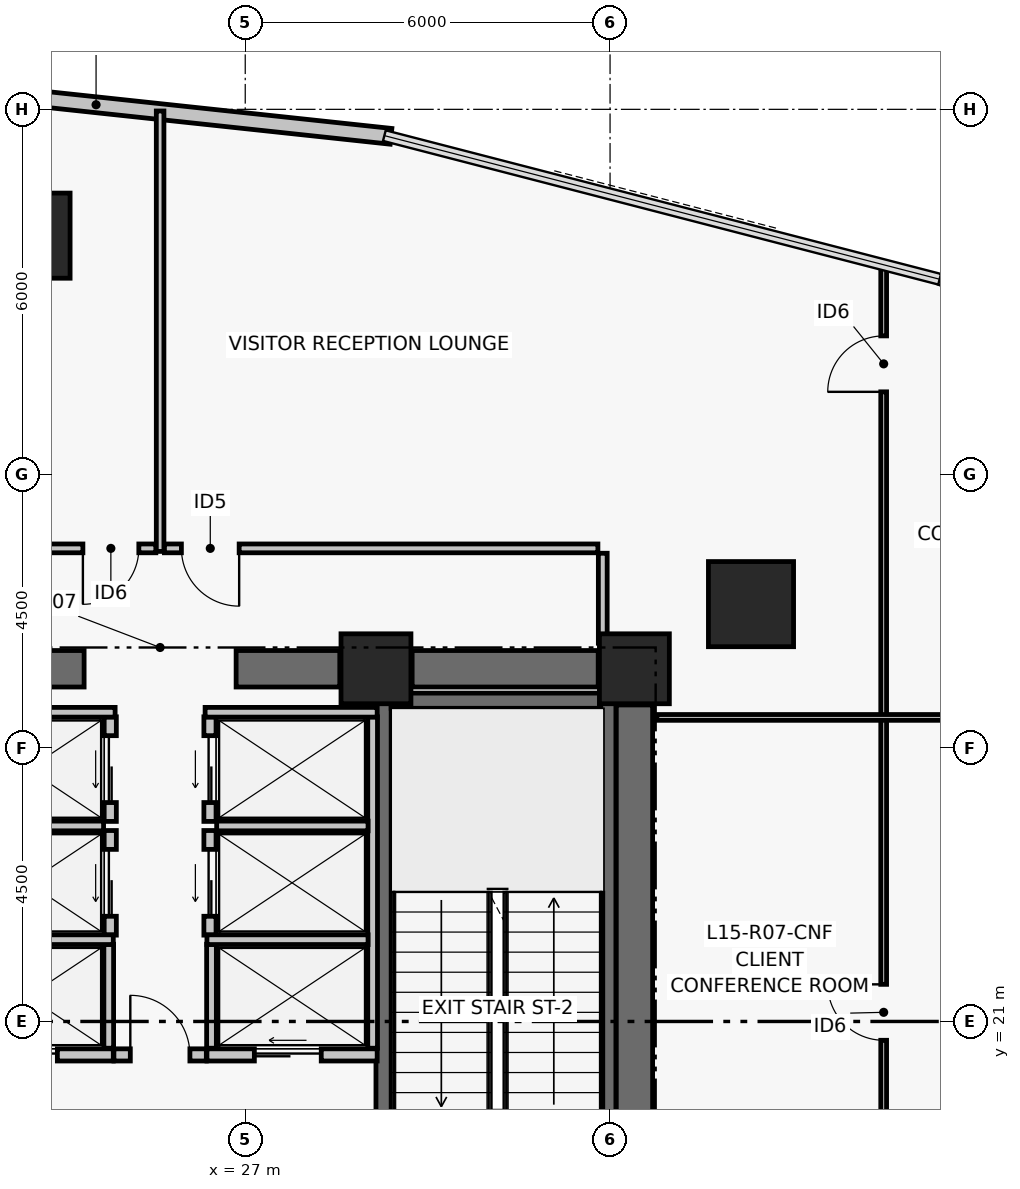
"""IFC4 building model, lengths in metres.
Left out: names, types, materials, properties, quantities, classifications, styles, units other than length and angle.
Written with IfcOpenShell. Run it as: python <this file> out.ifc"""

import sys

from ifc_helpers import new_model, si_unit, direction, frame, frame_2d, origin, origin_2d, place, context, subcontext, project, spatial, rectangle, hollow_rectangle, extrude, element, fill, save


model = new_model("IFC4")
c1 = context("Model", 3, precision=1e-05, world=origin(), true_north=direction((0.0, 1.0)))
c2 = subcontext(c1, "Body", "Model", "MODEL_VIEW")
j1 = project(units=[si_unit("LENGTHUNIT", "METRE"), si_unit("PLANEANGLEUNIT", "RADIAN")], contexts=[c1])
p1 = place(None, origin())
s1 = spatial("IfcSite", under=j1, at=p1, CompositionType="ELEMENT")
p2 = place(p1, origin())
s2 = spatial("IfcBuilding", under=s1, at=p2, CompositionType="ELEMENT")
p3 = place(p2, frame((0.0, 0.0, 64.8)))
s3 = spatial("IfcBuildingStorey", under=s2, at=p3, CompositionType="ELEMENT", Elevation=64.8)
for number, where, z_axis, x_axis in (
    (1, (29.15, 26.8, 0.0), (0.0, 0.0, 1.0), (1.0, 0.0, 0.0)),
    (2, (33.4, 26.8, 0.0), (0.0, 0.0, 1.0), (1.0, 0.0, 0.0)),
):
    element("IfcColumn", number, at=place(p3, frame(where, z_axis=z_axis, x_axis=x_axis)), inside=s3, PredefinedType="COLUMN", context=c2, shape_type="SweptSolid", body=[
        extrude(rectangle(XDim=1.15, YDim=1.15, at=origin_2d()), origin(), (0.0, 0.0, 1.0), 3.72),
    ])
p4 = place(p3, frame((22.645, 26.8, 0.0), z_axis=(0.0, 0.0, 1.0), x_axis=(1.0, 0.0, 0.0)))
e3 = element("IfcWall", 3, at=p4, inside=s3, PredefinedType="SHEAR", context=c2, shape_type="SweptSolid", body=[
    extrude(rectangle(XDim=1.705, YDim=0.6, at=frame_2d((0.853, 0.0))), origin(), (0.0, 0.0, 1.0), 3.44),
])
p5 = place(p3, frame((26.85, 26.8, 0.0), z_axis=(0.0, 0.0, 1.0), x_axis=(1.0, 0.0, 0.0)))
e4 = element("IfcWall", 4, at=p5, inside=s3, PredefinedType="SHEAR", context=c2, shape_type="SweptSolid", body=[
    extrude(rectangle(XDim=1.705, YDim=0.6, at=frame_2d((0.853, 0.0))), origin(), (0.0, 0.0, 1.0), 3.44),
])
p6 = place(p3, frame((29.745, 26.8, 0.0), z_axis=(0.0, 0.0, 1.0), x_axis=(1.0, 0.0, 0.0)))
e5 = element("IfcWall", 5, at=p6, inside=s3, PredefinedType="SHEAR", context=c2, shape_type="SweptSolid", body=[
    extrude(rectangle(XDim=3.06, YDim=0.6, at=frame_2d((1.53, 0.0))), origin(), (0.0, 0.0, 1.0), 3.44),
])
p7 = place(p3, frame((33.4, 17.795, 0.0), z_axis=(0.0, 0.0, 1.0), x_axis=(0.0, 1.0, 0.0)))
e6 = element("IfcWall", 6, at=p7, inside=s3, PredefinedType="SHEAR", context=c2, shape_type="SweptSolid", body=[
    extrude(rectangle(XDim=8.41, YDim=0.6, at=frame_2d((4.205, 0.0))), origin(), (0.0, 0.0, 1.0), 3.44),
])
p8 = place(p3, frame((29.275, 17.6, 0.0), z_axis=(0.0, 0.0, 1.0), x_axis=(0.0, 1.0, 0.0)))
e7 = element("IfcWall", 7, at=p8, inside=s3, PredefinedType="SHEAR", context=c2, shape_type="SweptSolid", body=[
    extrude(rectangle(XDim=8.8, YDim=0.25, at=frame_2d((4.4, 0.0))), origin(), (0.0, 0.0, 1.0), 3.44),
])
p9 = place(p8, frame((0.35, 0.0, 0.0)))
e8 = element("IfcOpeningElement", 8, at=p9, cuts=e7, PredefinedType="OPENING", context=c2, shape_type="SweptSolid", body=[
    extrude(rectangle(XDim=1.05, YDim=2.08, at=frame_2d((0.525, 1.04))), frame((0.0, 0.135, 0.0), z_axis=(0.0, -1.0, 0.0), x_axis=(1.0, 0.0, 0.0)), (0.0, 0.0, 1.0), 0.27),
])
p10 = place(p3, frame((32.971, 17.6, 0.0), z_axis=(0.0, 0.0, 1.0), x_axis=(0.0, 1.0, 0.0)))
e9 = element("IfcWall", 9, at=p10, inside=s3, PredefinedType="SHEAR", context=c2, shape_type="SweptSolid", body=[
    extrude(rectangle(XDim=8.8, YDim=0.25, at=frame_2d((4.4, 0.0))), origin(), (0.0, 0.0, 1.0), 3.44),
])
p11 = place(p3, frame((29.4, 26.275, 0.0), z_axis=(0.0, 0.0, 1.0), x_axis=(1.0, 0.0, 0.0)))
e10 = element("IfcWall", 10, at=p11, inside=s3, PredefinedType="SHEAR", context=c2, shape_type="SweptSolid", body=[
    extrude(rectangle(XDim=3.446, YDim=0.25, at=frame_2d((1.723, 0.0))), origin(), (0.0, 0.0, 1.0), 3.44),
])
for number, where, z_axis, x_axis in (
    (11, (35.318, 27.863, 0.0), (0.0, 0.0, 1.0), (1.0, 0.0, 0.0)),
    (12, (23.419, 33.923, 0.0), (0.0, 0.0, 1.0), (1.0, 0.0, 0.0)),
):
    element("IfcColumn", number, at=place(p3, frame(where, z_axis=z_axis, x_axis=x_axis)), inside=s3, PredefinedType="COLUMN", context=c2, shape_type="SweptSolid", body=[
        extrude(hollow_rectangle(XDim=1.4, YDim=1.4, WallThickness=0.055, at=origin_2d()), origin(), (0.0, 0.0, 1.0), 3.72),
    ])
p12 = place(p3, frame((19.696, 36.595, 0.0), z_axis=(0.0, 0.0, 1.0), x_axis=(0.994319088673, -0.106440358419, 0.0)))
e13 = element("IfcWall", 13, at=p12, inside=s3, PredefinedType="PARTITIONING", context=c2, shape_type="SweptSolid", body=[
    extrude(rectangle(XDim=9.757, YDim=0.26, at=frame_2d((4.879, 0.0))), origin(), (0.0, 0.0, 1.0), 3.44),
])
p13 = place(p3, frame((24.84, 20.45, 0.0), z_axis=(0.0, 0.0, 1.0), x_axis=(1.0, 0.0, 0.0)))
e14 = element("IfcWall", 14, at=p13, inside=s3, PredefinedType="PARTITIONING", context=c2, shape_type="SweptSolid", body=[
    extrude(rectangle(XDim=1.52, YDim=0.2, at=frame_2d((0.76, 0.0))), origin(), (0.0, 0.0, 1.0), 3.44),
])
p14 = place(p13, frame((0.27, 0.0, 0.0)))
e15 = element("IfcOpeningElement", 15, at=p14, cuts=e14, PredefinedType="OPENING", context=c2, shape_type="SweptSolid", body=[
    extrude(rectangle(XDim=0.98, YDim=2.06, at=frame_2d((0.49, 1.03))), frame((0.0, 0.11, 0.0), z_axis=(0.0, -1.0, 0.0), x_axis=(1.0, 0.0, 0.0)), (0.0, 0.0, 1.0), 0.22),
])
p15 = place(p3, frame((22.03, 20.45, 0.0), z_axis=(0.0, 0.0, 1.0), x_axis=(1.0, 0.0, 0.0)))
e16 = element("IfcWall", 16, at=p15, inside=s3, PredefinedType="PARTITIONING", context=c2, shape_type="SweptSolid", body=[
    extrude(rectangle(XDim=2.8, YDim=0.2, at=frame_2d((1.4, 0.0))), origin(), (0.0, 0.0, 1.0), 3.44),
])
p16 = place(p15, frame((0.78, 0.0, 0.0)))
e17 = element("IfcOpeningElement", 17, at=p16, cuts=e16, PredefinedType="OPENING", context=c2, shape_type="SweptSolid", body=[
    extrude(rectangle(XDim=1.1, YDim=2.08, at=frame_2d((0.55, 1.04))), frame((0.0, 0.11, 0.0), z_axis=(0.0, -1.0, 0.0), x_axis=(1.0, 0.0, 0.0)), (0.0, 0.0, 1.0), 0.22),
])
p17 = place(p3, frame((26.37, 20.45, 0.0), z_axis=(0.0, 0.0, 1.0), x_axis=(1.0, 0.0, 0.0)))
e18 = element("IfcWall", 18, at=p17, inside=s3, PredefinedType="PARTITIONING", context=c2, shape_type="SweptSolid", body=[
    extrude(rectangle(XDim=2.8, YDim=0.2, at=frame_2d((1.4, 0.0))), origin(), (0.0, 0.0, 1.0), 3.44),
])
p18 = place(p17, frame((0.78, 0.0, 0.0)))
e19 = element("IfcOpeningElement", 19, at=p18, cuts=e18, PredefinedType="OPENING", context=c2, shape_type="SweptSolid", body=[
    extrude(rectangle(XDim=1.1, YDim=2.08, at=frame_2d((0.55, 1.04))), frame((0.0, 0.11, 0.0), z_axis=(0.0, -1.0, 0.0), x_axis=(1.0, 0.0, 0.0)), (0.0, 0.0, 1.0), 0.22),
])
p19 = place(p3, frame((24.78, 22.42, 0.0), z_axis=(0.0, 0.0, 1.0), x_axis=(0.0, 1.0, 0.0)))
e20 = element("IfcWall", 20, at=p19, inside=s3, PredefinedType="PARTITIONING", context=c2, shape_type="SweptSolid", body=[
    extrude(rectangle(XDim=1.72, YDim=0.2, at=frame_2d((0.86, 0.0))), origin(), (0.0, 0.0, 1.0), 3.44),
])
p20 = place(p19, frame((0.31, 0.0, 0.0)))
e21 = element("IfcOpeningElement", 21, at=p20, cuts=e20, PredefinedType="OPENING", context=c2, shape_type="SweptSolid", body=[
    extrude(rectangle(XDim=1.1, YDim=2.08, at=frame_2d((0.55, 1.04))), frame((0.0, 0.11, 0.0), z_axis=(0.0, -1.0, 0.0), x_axis=(1.0, 0.0, 0.0)), (0.0, 0.0, 1.0), 0.22),
])
p21 = place(p3, frame((24.78, 24.29, 0.0), z_axis=(0.0, 0.0, 1.0), x_axis=(0.0, 1.0, 0.0)))
e22 = element("IfcWall", 22, at=p21, inside=s3, PredefinedType="PARTITIONING", context=c2, shape_type="SweptSolid", body=[
    extrude(rectangle(XDim=1.72, YDim=0.2, at=frame_2d((0.86, 0.0))), origin(), (0.0, 0.0, 1.0), 3.44),
])
p22 = place(p21, frame((0.31, 0.0, 0.0)))
e23 = element("IfcOpeningElement", 23, at=p22, cuts=e22, PredefinedType="OPENING", context=c2, shape_type="SweptSolid", body=[
    extrude(rectangle(XDim=1.1, YDim=2.08, at=frame_2d((0.55, 1.04))), frame((0.0, 0.11, 0.0), z_axis=(0.0, -1.0, 0.0), x_axis=(1.0, 0.0, 0.0)), (0.0, 0.0, 1.0), 0.22),
])
p23 = place(p3, frame((26.42, 22.42, 0.0), z_axis=(0.0, 0.0, 1.0), x_axis=(0.0, 1.0, 0.0)))
e24 = element("IfcWall", 24, at=p23, inside=s3, PredefinedType="PARTITIONING", context=c2, shape_type="SweptSolid", body=[
    extrude(rectangle(XDim=1.72, YDim=0.2, at=frame_2d((0.86, 0.0))), origin(), (0.0, 0.0, 1.0), 3.44),
])
p24 = place(p23, frame((0.31, 0.0, 0.0)))
e25 = element("IfcOpeningElement", 25, at=p24, cuts=e24, PredefinedType="OPENING", context=c2, shape_type="SweptSolid", body=[
    extrude(rectangle(XDim=1.1, YDim=2.08, at=frame_2d((0.55, 1.04))), frame((0.0, 0.11, 0.0), z_axis=(0.0, -1.0, 0.0), x_axis=(1.0, 0.0, 0.0)), (0.0, 0.0, 1.0), 0.22),
])
p25 = place(p3, frame((26.42, 24.29, 0.0), z_axis=(0.0, 0.0, 1.0), x_axis=(0.0, 1.0, 0.0)))
e26 = element("IfcWall", 26, at=p25, inside=s3, PredefinedType="PARTITIONING", context=c2, shape_type="SweptSolid", body=[
    extrude(rectangle(XDim=1.72, YDim=0.2, at=frame_2d((0.86, 0.0))), origin(), (0.0, 0.0, 1.0), 3.44),
])
p26 = place(p25, frame((0.31, 0.0, 0.0)))
e27 = element("IfcOpeningElement", 27, at=p26, cuts=e26, PredefinedType="OPENING", context=c2, shape_type="SweptSolid", body=[
    extrude(rectangle(XDim=1.1, YDim=2.08, at=frame_2d((0.55, 1.04))), frame((0.0, 0.11, 0.0), z_axis=(0.0, -1.0, 0.0), x_axis=(1.0, 0.0, 0.0)), (0.0, 0.0, 1.0), 0.22),
])
p27 = place(p3, frame((24.755, 20.56, 0.0), z_axis=(0.0, 0.0, 1.0), x_axis=(0.0, 1.0, 0.0)))
e28 = element("IfcWall", 28, at=p27, inside=s3, PredefinedType="PARTITIONING", context=c2, shape_type="SweptSolid", body=[
    extrude(rectangle(XDim=1.71, YDim=0.16, at=frame_2d((0.855, 0.0))), origin(), (0.0, 0.0, 1.0), 3.44),
])
p28 = place(p3, frame((22.18, 22.345, 0.0), z_axis=(0.0, 0.0, 1.0), x_axis=(1.0, 0.0, 0.0)))
e29 = element("IfcWall", 29, at=p28, inside=s3, PredefinedType="PARTITIONING", context=c2, shape_type="SweptSolid", body=[
    extrude(rectangle(XDim=2.65, YDim=0.16, at=frame_2d((1.325, 0.0))), origin(), (0.0, 0.0, 1.0), 3.44),
])
p29 = place(p3, frame((22.18, 24.215, 0.0), z_axis=(0.0, 0.0, 1.0), x_axis=(1.0, 0.0, 0.0)))
e30 = element("IfcWall", 30, at=p29, inside=s3, PredefinedType="PARTITIONING", context=c2, shape_type="SweptSolid", body=[
    extrude(rectangle(XDim=2.49, YDim=0.16, at=frame_2d((1.245, 0.0))), origin(), (0.0, 0.0, 1.0), 3.44),
])
p30 = place(p3, frame((22.03, 26.085, 0.0), z_axis=(0.0, 0.0, 1.0), x_axis=(1.0, 0.0, 0.0)))
e31 = element("IfcWall", 31, at=p30, inside=s3, PredefinedType="PARTITIONING", context=c2, shape_type="SweptSolid", body=[
    extrude(rectangle(XDim=2.83, YDim=0.16, at=frame_2d((1.415, 0.0))), origin(), (0.0, 0.0, 1.0), 3.44),
])
p31 = place(p3, frame((29.095, 20.56, 0.0), z_axis=(0.0, 0.0, 1.0), x_axis=(0.0, 1.0, 0.0)))
e32 = element("IfcWall", 32, at=p31, inside=s3, PredefinedType="PARTITIONING", context=c2, shape_type="SweptSolid", body=[
    extrude(rectangle(XDim=5.45, YDim=0.16, at=frame_2d((2.725, 0.0))), origin(), (0.0, 0.0, 1.0), 3.44),
])
p32 = place(p3, frame((26.445, 20.56, 0.0), z_axis=(0.0, 0.0, 1.0), x_axis=(0.0, 1.0, 0.0)))
e33 = element("IfcWall", 33, at=p32, inside=s3, PredefinedType="PARTITIONING", context=c2, shape_type="SweptSolid", body=[
    extrude(rectangle(XDim=1.71, YDim=0.16, at=frame_2d((0.855, 0.0))), origin(), (0.0, 0.0, 1.0), 3.44),
])
p33 = place(p3, frame((26.37, 22.345, 0.0), z_axis=(0.0, 0.0, 1.0), x_axis=(1.0, 0.0, 0.0)))
e34 = element("IfcWall", 34, at=p33, inside=s3, PredefinedType="PARTITIONING", context=c2, shape_type="SweptSolid", body=[
    extrude(rectangle(XDim=2.65, YDim=0.16, at=frame_2d((1.325, 0.0))), origin(), (0.0, 0.0, 1.0), 3.44),
])
p34 = place(p3, frame((26.53, 24.215, 0.0), z_axis=(0.0, 0.0, 1.0), x_axis=(1.0, 0.0, 0.0)))
e35 = element("IfcWall", 35, at=p34, inside=s3, PredefinedType="PARTITIONING", context=c2, shape_type="SweptSolid", body=[
    extrude(rectangle(XDim=2.49, YDim=0.16, at=frame_2d((1.245, 0.0))), origin(), (0.0, 0.0, 1.0), 3.44),
])
p35 = place(p3, frame((26.34, 26.085, 0.0), z_axis=(0.0, 0.0, 1.0), x_axis=(1.0, 0.0, 0.0)))
e36 = element("IfcWall", 36, at=p35, inside=s3, PredefinedType="PARTITIONING", context=c2, shape_type="SweptSolid", body=[
    extrude(rectangle(XDim=2.83, YDim=0.16, at=frame_2d((1.415, 0.0))), origin(), (0.0, 0.0, 1.0), 3.44),
])
p36 = place(p3, frame((33.74, 27.22, 0.0), z_axis=(0.0, 0.0, 1.0), x_axis=(-1.0, 0.0, 0.0)))
e37 = element("IfcWall", 37, at=p36, inside=s3, PredefinedType="PARTITIONING", context=c2, shape_type="SweptSolid", body=[
    extrude(rectangle(XDim=0.86, YDim=0.145, at=frame_2d((0.43, 0.0))), origin(), (0.0, 0.0, 1.0), 2.57),
])
p37 = place(p3, frame((32.88, 27.22, 0.0), z_axis=(0.0, 0.0, 1.0), x_axis=(0.0, 1.0, 0.0)))
e38 = element("IfcWall", 38, at=p37, inside=s3, PredefinedType="PARTITIONING", context=c2, shape_type="SweptSolid", body=[
    extrude(rectangle(XDim=1.48, YDim=0.145, at=frame_2d((0.74, 0.0))), origin(), (0.0, 0.0, 1.0), 2.57),
])
p38 = place(p3, frame((32.8, 28.78, 0.0), z_axis=(0.0, 0.0, 1.0), x_axis=(-1.0, 0.0, 0.0)))
e39 = element("IfcWall", 39, at=p38, inside=s3, PredefinedType="PARTITIONING", context=c2, shape_type="SweptSolid", body=[
    extrude(rectangle(XDim=7.13, YDim=0.145, at=frame_2d((3.565, 0.0))), origin(), (0.0, 0.0, 1.0), 2.97),
])
p39 = place(p38, frame((5.9, 0.0, 0.0)))
e40 = element("IfcOpeningElement", 40, at=p39, cuts=e39, PredefinedType="OPENING", context=c2, shape_type="SweptSolid", body=[
    extrude(rectangle(XDim=0.95, YDim=2.06, at=frame_2d((0.475, 1.03))), frame((0.0, 0.083, 0.0), z_axis=(0.0, -1.0, 0.0), x_axis=(1.0, 0.0, 0.0)), (0.0, 0.0, 1.0), 0.165),
])
p40 = place(p3, frame((25.53, 28.78, 0.0), z_axis=(0.0, 0.0, 1.0), x_axis=(-1.0, 0.0, 0.0)))
e41 = element("IfcWall", 41, at=p40, inside=s3, PredefinedType="PARTITIONING", context=c2, shape_type="SweptSolid", body=[
    extrude(rectangle(XDim=9.63, YDim=0.145, at=frame_2d((4.815, 0.0))), origin(), (0.0, 0.0, 1.0), 2.57),
])
p41 = place(p40, frame((0.28, 0.0, 0.0)))
e42 = element("IfcOpeningElement", 42, at=p41, cuts=e41, PredefinedType="OPENING", context=c2, shape_type="SweptSolid", body=[
    extrude(rectangle(XDim=0.92, YDim=2.05, at=frame_2d((0.46, 1.025))), frame((0.0, 0.083, 0.0), z_axis=(0.0, -1.0, 0.0), x_axis=(1.0, 0.0, 0.0)), (0.0, 0.0, 1.0), 0.165),
])
p42 = place(p3, frame((25.6, 28.73, 0.0), z_axis=(0.0, 0.0, 1.0), x_axis=(0.0, 1.0, 0.0)))
e43 = element("IfcWall", 43, at=p42, inside=s3, PredefinedType="PARTITIONING", context=c2, shape_type="SweptSolid", body=[
    extrude(rectangle(XDim=7.243, YDim=0.125, at=frame_2d((3.622, 0.0))), origin(), (0.0, 0.0, 1.0), 2.82),
])
p43 = place(p3, frame((37.5, 10.546, 0.0), z_axis=(0.0, 0.0, 1.0), x_axis=(0.0, 1.0, 0.0)))
e44 = element("IfcWall", 44, at=p43, inside=s3, PredefinedType="PARTITIONING", context=c2, shape_type="SweptSolid", body=[
    extrude(rectangle(XDim=22.909, YDim=0.095, at=frame_2d((11.454, 0.0))), origin(), (0.0, 0.0, 1.0), 2.57),
])
p44 = place(p43, frame((1.18, 0.0, 0.0)))
e45 = element("IfcOpeningElement", 45, at=p44, cuts=e44, PredefinedType="OPENING", context=c2, shape_type="SweptSolid", body=[
    extrude(rectangle(XDim=0.92, YDim=2.05, at=frame_2d((0.46, 1.025))), frame((0.0, 0.057, 0.0), z_axis=(0.0, -1.0, 0.0), x_axis=(1.0, 0.0, 0.0)), (0.0, 0.0, 1.0), 0.115),
])
p45 = place(p43, frame((10.145, 0.0, 0.0)))
e46 = element("IfcOpeningElement", 46, at=p45, cuts=e44, PredefinedType="OPENING", context=c2, shape_type="SweptSolid", body=[
    extrude(rectangle(XDim=0.92, YDim=2.05, at=frame_2d((0.46, 1.025))), frame((0.0, 0.057, 0.0), z_axis=(0.0, -1.0, 0.0), x_axis=(1.0, 0.0, 0.0)), (0.0, 0.0, 1.0), 0.115),
])
p46 = place(p43, frame((20.809, 0.0, 0.0)))
e47 = element("IfcOpeningElement", 47, at=p46, cuts=e44, PredefinedType="OPENING", context=c2, shape_type="SweptSolid", body=[
    extrude(rectangle(XDim=0.92, YDim=2.05, at=frame_2d((0.46, 1.025))), frame((0.0, 0.057, 0.0), z_axis=(0.0, -1.0, 0.0), x_axis=(1.0, 0.0, 0.0)), (0.0, 0.0, 1.0), 0.115),
])
p47 = place(p3, frame((33.77, 26.0, 0.0), z_axis=(0.0, 0.0, 1.0), x_axis=(1.0, 0.0, 0.0)))
e48 = element("IfcWall", 48, at=p47, inside=s3, PredefinedType="PARTITIONING", context=c2, shape_type="SweptSolid", body=[
    extrude(rectangle(XDim=19.078, YDim=0.095, at=frame_2d((9.539, 0.0))), origin(), (0.0, 0.0, 1.0), 2.57),
])
p48 = place(p14, origin())
e49 = element("IfcDoor", 49, at=p48, inside=s3, OperationType="SINGLE_SWING_LEFT", PredefinedType="DOOR", context=c2, shape_type="SweptSolid", body=[
    extrude(rectangle(XDim=0.98, YDim=2.06, at=frame_2d((0.49, 1.03))), frame((0.0, 0.025, 0.0), z_axis=(0.0, -1.0, 0.0), x_axis=(1.0, 0.0, 0.0)), (0.0, 0.0, 1.0), 0.05),
])
fill(e15, e49)
p49 = place(p16, origin())
e50 = element("IfcDoor", 50, at=p49, inside=s3, OperationType="DOUBLE_DOOR_SLIDING", PredefinedType="DOOR", context=c2, shape_type="SweptSolid", body=[
    extrude(rectangle(XDim=1.1, YDim=2.08, at=frame_2d((0.55, 1.04))), frame((0.0, 0.025, 0.0), z_axis=(0.0, -1.0, 0.0), x_axis=(1.0, 0.0, 0.0)), (0.0, 0.0, 1.0), 0.05),
])
fill(e17, e50)
p50 = place(p18, origin())
e51 = element("IfcDoor", 51, at=p50, inside=s3, OperationType="DOUBLE_DOOR_SLIDING", PredefinedType="DOOR", context=c2, shape_type="SweptSolid", body=[
    extrude(rectangle(XDim=1.1, YDim=2.08, at=frame_2d((0.55, 1.04))), frame((0.0, 0.025, 0.0), z_axis=(0.0, -1.0, 0.0), x_axis=(1.0, 0.0, 0.0)), (0.0, 0.0, 1.0), 0.05),
])
fill(e19, e51)
p51 = place(p20, origin())
e52 = element("IfcDoor", 52, at=p51, inside=s3, OperationType="DOUBLE_DOOR_SLIDING", PredefinedType="DOOR", context=c2, shape_type="SweptSolid", body=[
    extrude(rectangle(XDim=1.1, YDim=2.08, at=frame_2d((0.55, 1.04))), frame((0.0, 0.025, 0.0), z_axis=(0.0, -1.0, 0.0), x_axis=(1.0, 0.0, 0.0)), (0.0, 0.0, 1.0), 0.05),
])
fill(e21, e52)
p52 = place(p22, origin())
e53 = element("IfcDoor", 53, at=p52, inside=s3, OperationType="DOUBLE_DOOR_SLIDING", PredefinedType="DOOR", context=c2, shape_type="SweptSolid", body=[
    extrude(rectangle(XDim=1.1, YDim=2.08, at=frame_2d((0.55, 1.04))), frame((0.0, 0.025, 0.0), z_axis=(0.0, -1.0, 0.0), x_axis=(1.0, 0.0, 0.0)), (0.0, 0.0, 1.0), 0.05),
])
fill(e23, e53)
p53 = place(p24, origin())
e54 = element("IfcDoor", 54, at=p53, inside=s3, OperationType="DOUBLE_DOOR_SLIDING", PredefinedType="DOOR", context=c2, shape_type="SweptSolid", body=[
    extrude(rectangle(XDim=1.1, YDim=2.08, at=frame_2d((0.55, 1.04))), frame((0.0, 0.025, 0.0), z_axis=(0.0, -1.0, 0.0), x_axis=(1.0, 0.0, 0.0)), (0.0, 0.0, 1.0), 0.05),
])
fill(e25, e54)
p54 = place(p26, origin())
e55 = element("IfcDoor", 55, at=p54, inside=s3, OperationType="DOUBLE_DOOR_SLIDING", PredefinedType="DOOR", context=c2, shape_type="SweptSolid", body=[
    extrude(rectangle(XDim=1.1, YDim=2.08, at=frame_2d((0.55, 1.04))), frame((0.0, 0.025, 0.0), z_axis=(0.0, -1.0, 0.0), x_axis=(1.0, 0.0, 0.0)), (0.0, 0.0, 1.0), 0.05),
])
fill(e27, e55)
p55 = place(p39, origin())
e56 = element("IfcDoor", 56, at=p55, inside=s3, OperationType="SINGLE_SWING_LEFT", PredefinedType="DOOR", context=c2, shape_type="SweptSolid", body=[
    extrude(rectangle(XDim=0.95, YDim=2.06, at=frame_2d((0.475, 1.03))), frame((0.0, 0.025, 0.0), z_axis=(0.0, -1.0, 0.0), x_axis=(1.0, 0.0, 0.0)), (0.0, 0.0, 1.0), 0.05),
])
fill(e40, e56)
p56 = place(p41, origin())
e57 = element("IfcDoor", 57, at=p56, inside=s3, OperationType="SINGLE_SWING_RIGHT", PredefinedType="DOOR", context=c2, shape_type="SweptSolid", body=[
    extrude(rectangle(XDim=0.92, YDim=2.05, at=frame_2d((0.46, 1.025))), frame((0.0, 0.025, 0.0), z_axis=(0.0, -1.0, 0.0), x_axis=(1.0, 0.0, 0.0)), (0.0, 0.0, 1.0), 0.05),
])
fill(e42, e57)
p57 = place(p45, origin())
e58 = element("IfcDoor", 58, at=p57, inside=s3, OperationType="SINGLE_SWING_RIGHT", PredefinedType="DOOR", context=c2, shape_type="SweptSolid", body=[
    extrude(rectangle(XDim=0.92, YDim=2.05, at=frame_2d((0.46, 1.025))), frame((0.0, 0.025, 0.0), z_axis=(0.0, -1.0, 0.0), x_axis=(1.0, 0.0, 0.0)), (0.0, 0.0, 1.0), 0.05),
])
fill(e46, e58)
p58 = place(p46, origin())
e59 = element("IfcDoor", 59, at=p58, inside=s3, OperationType="SINGLE_SWING_LEFT", PredefinedType="DOOR", context=c2, shape_type="SweptSolid", body=[
    extrude(rectangle(XDim=0.92, YDim=2.05, at=frame_2d((0.46, 1.025))), frame((0.0, 0.025, 0.0), z_axis=(0.0, -1.0, 0.0), x_axis=(1.0, 0.0, 0.0)), (0.0, 0.0, 1.0), 0.05),
])
fill(e47, e59)
save(model, sys.argv[1])
